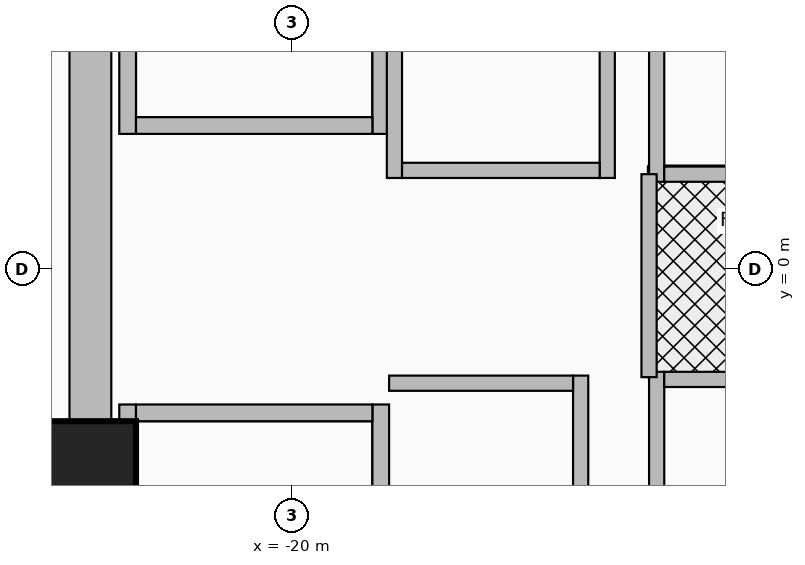
"""IFC4 building model, lengths in metres.
Left out: names, types, materials, properties, quantities, classifications, styles, units other than length and angle.
Written with IfcOpenShell. Run it as: python <this file> out.ifc"""

import sys

from ifc_helpers import new_model, si_unit, direction, frame, frame_2d, origin, origin_2d, place, context, subcontext, project, spatial, rectangle, extrude, source, transform, mapped, element, fill, save


model = new_model("IFC4")
c1 = context("Model", 3, precision=1e-05, world=origin(), true_north=direction((0.0, 1.0)))
c2 = subcontext(c1, "Body", "Model", "MODEL_VIEW")
j1 = project(units=[si_unit("LENGTHUNIT", "METRE"), si_unit("PLANEANGLEUNIT", "RADIAN")], contexts=[c1])
p1 = place(None, origin())
s1 = spatial("IfcSite", under=j1, at=p1, CompositionType="ELEMENT")
p2 = place(p1, origin())
s2 = spatial("IfcBuilding", under=s1, at=p2, CompositionType="ELEMENT")
p3 = place(p2, frame((0.0, 0.0, 153.8)))
s3 = spatial("IfcBuildingStorey", under=s2, at=p3, CompositionType="ELEMENT", Elevation=153.8)
for number, where, z_axis, x_axis in (
    (1, (-22.16, 1.78, 0.0), (0.0, 0.0, 1.0), (0.0, 1.0, 0.0)),
    (2, (-18.83, 1.78, 0.0), (0.0, 0.0, 1.0), (0.0, 1.0, 0.0)),
):
    element("IfcWall", number, at=place(p3, frame(where, z_axis=z_axis, x_axis=x_axis)), inside=s3, PredefinedType="SHEAR", context=c2, shape_type="SweptSolid", body=[
        extrude(rectangle(XDim=8.745, YDim=0.22, at=frame_2d((4.373, 0.0))), origin(), (0.0, 0.0, 1.0), 3.46),
    ])
p4 = place(p3, frame((-22.05, 1.89, 0.0), z_axis=(0.0, 0.0, 1.0), x_axis=(1.0, 0.0, 0.0)))
e3 = element("IfcWall", 3, at=p4, inside=s3, PredefinedType="SHEAR", context=c2, shape_type="SweptSolid", body=[
    extrude(rectangle(XDim=3.11, YDim=0.22, at=frame_2d((1.555, 0.0))), origin(), (0.0, 0.0, 1.0), 3.46),
])
p5 = place(p4, frame((1.0, 0.0, 0.0)))
e4 = element("IfcOpeningElement", 4, at=p5, cuts=e3, PredefinedType="OPENING", context=c2, shape_type="SweptSolid", body=[
    extrude(rectangle(XDim=1.1, YDim=2.15, at=frame_2d((0.55, 1.075))), frame((0.0, 0.125, 0.0), z_axis=(0.0, -1.0, 0.0), x_axis=(1.0, 0.0, 0.0)), (0.0, 0.0, 1.0), 0.25),
])
for number, where, z_axis, x_axis in (
    (5, (-22.16, -10.525, 0.0), (0.0, 0.0, 1.0), (0.0, 1.0, 0.0)),
    (6, (-18.83, -10.525, 0.0), (0.0, 0.0, 1.0), (0.0, 1.0, 0.0)),
):
    element("IfcWall", number, at=place(p3, frame(where, z_axis=z_axis, x_axis=x_axis)), inside=s3, PredefinedType="SHEAR", context=c2, shape_type="SweptSolid", body=[
        extrude(rectangle(XDim=8.745, YDim=0.22, at=frame_2d((4.373, 0.0))), origin(), (0.0, 0.0, 1.0), 3.46),
    ])
p6 = place(p3, frame((-22.05, -1.89, 0.0), z_axis=(0.0, 0.0, 1.0), x_axis=(1.0, 0.0, 0.0)))
e7 = element("IfcWall", 7, at=p6, inside=s3, PredefinedType="SHEAR", context=c2, shape_type="SweptSolid", body=[
    extrude(rectangle(XDim=3.11, YDim=0.22, at=frame_2d((1.555, 0.0))), origin(), (0.0, 0.0, 1.0), 3.46),
])
p7 = place(p6, frame((1.0, 0.0, 0.0)))
e8 = element("IfcOpeningElement", 8, at=p7, cuts=e7, PredefinedType="OPENING", context=c2, shape_type="SweptSolid", body=[
    extrude(rectangle(XDim=1.1, YDim=2.15, at=frame_2d((0.55, 1.075))), frame((0.0, 0.125, 0.0), z_axis=(0.0, -1.0, 0.0), x_axis=(1.0, 0.0, 0.0)), (0.0, 0.0, 1.0), 0.25),
])
p8 = place(p3, frame((-22.65, -11.075, 0.0), z_axis=(0.0, 0.0, 1.0), x_axis=(0.0, 1.0, 0.0)))
e9 = element("IfcWall", 9, at=p8, inside=s3, PredefinedType="SHEAR", context=c2, shape_type="SweptSolid", body=[
    extrude(rectangle(XDim=22.15, YDim=0.55, at=frame_2d((11.075, 0.0))), origin(), (0.0, 0.0, 1.0), 3.46),
])
m1 = source(origin(), c2, "Body", "SweptSolid", [
    extrude(rectangle(XDim=1.2, YDim=1.2, at=origin_2d()), origin(), (0.0, 0.0, 1.0), 3.7),
])
p9 = place(p3, frame((-22.65, -2.6, 0.0), z_axis=(0.0, 0.0, 1.0), x_axis=(1.0, 0.0, 0.0)))
e10 = element("IfcColumn", 10, at=p9, inside=s3, PredefinedType="COLUMN", context=c2, shape_type="MappedRepresentation", body=[
    mapped(m1, transform((0.0, 0.0, 0.0), x_axis=(1.0, 0.0, 0.0), y_axis=(0.0, 1.0, 0.0), z_axis=(0.0, 0.0, 1.0), scale=1.0)),
])
for number, where, z_axis, x_axis in (
    (11, (-18.65, 1.2, 0.0), (0.0, 0.0, 1.0), (0.0, 1.0, 0.0)),
    (12, (-15.85, 1.2, 0.0), (0.0, 0.0, 1.0), (0.0, 1.0, 0.0)),
):
    element("IfcWall", number, at=place(p3, frame(where, z_axis=z_axis, x_axis=x_axis)), inside=s3, PredefinedType="MOVABLE", context=c2, shape_type="SweptSolid", body=[
        extrude(rectangle(XDim=3.225, YDim=0.2, at=frame_2d((1.613, 0.0))), origin(), (0.0, 0.0, 1.0), 3.46),
    ])
p10 = place(p3, frame((-18.55, 1.3, 0.0), z_axis=(0.0, 0.0, 1.0), x_axis=(1.0, 0.0, 0.0)))
e13 = element("IfcWall", 13, at=p10, inside=s3, PredefinedType="MOVABLE", context=c2, shape_type="SweptSolid", body=[
    extrude(rectangle(XDim=2.6, YDim=0.2, at=frame_2d((1.3, 0.0))), origin(), (0.0, 0.0, 1.0), 3.46),
])
p11 = place(p10, frame((0.7, 0.0, 0.0)))
e14 = element("IfcOpeningElement", 14, at=p11, cuts=e13, PredefinedType="OPENING", context=c2, shape_type="SweptSolid", body=[
    extrude(rectangle(XDim=1.2, YDim=2.1, at=frame_2d((0.6, 1.05))), frame((0.0, 0.115, 0.0), z_axis=(0.0, -1.0, 0.0), x_axis=(1.0, 0.0, 0.0)), (0.0, 0.0, 1.0), 0.23),
])
p12 = place(p3, frame((-16.2, -4.6, 0.0), z_axis=(0.0, 0.0, 1.0), x_axis=(0.0, 1.0, 0.0)))
e15 = element("IfcWall", 15, at=p12, inside=s3, PredefinedType="MOVABLE", context=c2, shape_type="SweptSolid", body=[
    extrude(rectangle(XDim=3.2, YDim=0.2, at=frame_2d((1.6, 0.0))), origin(), (0.0, 0.0, 1.0), 3.46),
])
p13 = place(p3, frame((-18.72, -1.5, 0.0), z_axis=(0.0, 0.0, 1.0), x_axis=(1.0, 0.0, 0.0)))
e16 = element("IfcWall", 16, at=p13, inside=s3, PredefinedType="MOVABLE", context=c2, shape_type="SweptSolid", body=[
    extrude(rectangle(XDim=2.42, YDim=0.2, at=frame_2d((1.21, 0.0))), origin(), (0.0, 0.0, 1.0), 3.46),
])
p14 = place(p13, frame((0.61, 0.0, 0.0)))
e17 = element("IfcOpeningElement", 17, at=p14, cuts=e16, PredefinedType="OPENING", context=c2, shape_type="SweptSolid", body=[
    extrude(rectangle(XDim=1.2, YDim=2.1, at=frame_2d((0.6, 1.05))), frame((0.0, 0.115, 0.0), z_axis=(0.0, -1.0, 0.0), x_axis=(1.0, 0.0, 0.0)), (0.0, 0.0, 1.0), 0.23),
])
p15 = place(p3, frame((-15.2, 1.15, 0.0), z_axis=(0.0, 0.0, 1.0), x_axis=(0.0, 1.0, 0.0)))
e18 = element("IfcWall", 18, at=p15, inside=s3, PredefinedType="MOVABLE", context=c2, shape_type="SweptSolid", body=[
    extrude(rectangle(XDim=2.25, YDim=0.2, at=frame_2d((1.125, 0.0))), origin(), (0.0, 0.0, 1.0), 3.46),
])
p16 = place(p3, frame((-15.1, 1.25, 0.0), z_axis=(0.0, 0.0, 1.0), x_axis=(1.0, 0.0, 0.0)))
e19 = element("IfcWall", 19, at=p16, inside=s3, PredefinedType="MOVABLE", context=c2, shape_type="SweptSolid", body=[
    extrude(rectangle(XDim=1.92, YDim=0.2, at=frame_2d((0.96, 0.0))), origin(), (0.0, 0.0, 1.0), 3.46),
])
p17 = place(p3, frame((-15.2, -3.7, 0.0), z_axis=(0.0, 0.0, 1.0), x_axis=(0.0, 1.0, 0.0)))
e20 = element("IfcWall", 20, at=p17, inside=s3, PredefinedType="MOVABLE", context=c2, shape_type="SweptSolid", body=[
    extrude(rectangle(XDim=2.35, YDim=0.2, at=frame_2d((1.175, 0.0))), origin(), (0.0, 0.0, 1.0), 3.46),
])
p18 = place(p3, frame((-15.1, -1.45, 0.0), z_axis=(0.0, 0.0, 1.0), x_axis=(1.0, 0.0, 0.0)))
e21 = element("IfcWall", 21, at=p18, inside=s3, PredefinedType="MOVABLE", context=c2, shape_type="SweptSolid", body=[
    extrude(rectangle(XDim=1.92, YDim=0.2, at=frame_2d((0.96, 0.0))), origin(), (0.0, 0.0, 1.0), 3.46),
])
p19 = place(p3, frame((-15.3, -1.42, 0.0), z_axis=(0.0, 0.0, 1.0), x_axis=(0.0, 1.0, 0.0)))
e22 = element("IfcWall", 22, at=p19, inside=s3, PredefinedType="PARTITIONING", context=c2, shape_type="SweptSolid", body=[
    extrude(rectangle(XDim=2.67, YDim=0.2, at=frame_2d((1.335, 0.0))), origin(), (0.0, 0.0, 1.0), 3.46),
])
p20 = place(p19, frame((0.78, 0.0, 0.0)))
e23 = element("IfcOpeningElement", 23, at=p20, cuts=e22, PredefinedType="OPENING", context=c2, shape_type="SweptSolid", body=[
    extrude(rectangle(XDim=1.05, YDim=2.15, at=frame_2d((0.525, 1.075))), frame((0.0, 0.115, 0.0), z_axis=(0.0, -1.0, 0.0), x_axis=(1.0, 0.0, 0.0)), (0.0, 0.0, 1.0), 0.23),
])
p21 = place(p11, origin())
e24 = element("IfcDoor", 24, at=p21, inside=s3, OperationType="DOUBLE_DOOR_SLIDING", PredefinedType="DOOR", context=c2, shape_type="SweptSolid", body=[
    extrude(rectangle(XDim=1.2, YDim=2.1, at=frame_2d((0.6, 1.05))), frame((0.0, 0.025, 0.0), z_axis=(0.0, -1.0, 0.0), x_axis=(1.0, 0.0, 0.0)), (0.0, 0.0, 1.0), 0.05),
])
fill(e14, e24)
p22 = place(p14, origin())
e25 = element("IfcDoor", 25, at=p22, inside=s3, OperationType="DOUBLE_DOOR_SLIDING", PredefinedType="DOOR", context=c2, shape_type="SweptSolid", body=[
    extrude(rectangle(XDim=1.2, YDim=2.1, at=frame_2d((0.6, 1.05))), frame((0.0, 0.025, 0.0), z_axis=(0.0, -1.0, 0.0), x_axis=(1.0, 0.0, 0.0)), (0.0, 0.0, 1.0), 0.05),
])
fill(e17, e25)
p23 = place(p20, origin())
e26 = element("IfcDoor", 26, at=p23, inside=s3, OperationType="SINGLE_SWING_RIGHT", PredefinedType="DOOR", context=c2, shape_type="SweptSolid", body=[
    extrude(rectangle(XDim=1.05, YDim=2.15, at=frame_2d((0.525, 1.075))), frame((0.0, 0.025, 0.0), z_axis=(0.0, -1.0, 0.0), x_axis=(1.0, 0.0, 0.0)), (0.0, 0.0, 1.0), 0.05),
])
fill(e23, e26)
p24 = place(p5, frame((1.1, 0.0, 0.0), z_axis=(0.0, 0.0, 1.0), x_axis=(-1.0, 0.0, 0.0)))
e27 = element("IfcDoor", 27, at=p24, inside=s3, OperationType="SINGLE_SWING_LEFT", PredefinedType="DOOR", context=c2, shape_type="SweptSolid", body=[
    extrude(rectangle(XDim=1.1, YDim=2.15, at=frame_2d((0.55, 1.075))), frame((0.0, 0.025, 0.0), z_axis=(0.0, -1.0, 0.0), x_axis=(1.0, 0.0, 0.0)), (0.0, 0.0, 1.0), 0.05),
])
fill(e4, e27)
p25 = place(p7, origin())
e28 = element("IfcDoor", 28, at=p25, inside=s3, OperationType="SINGLE_SWING_RIGHT", PredefinedType="DOOR", context=c2, shape_type="SweptSolid", body=[
    extrude(rectangle(XDim=1.1, YDim=2.15, at=frame_2d((0.55, 1.075))), frame((0.0, 0.025, 0.0), z_axis=(0.0, -1.0, 0.0), x_axis=(1.0, 0.0, 0.0)), (0.0, 0.0, 1.0), 0.05),
])
fill(e8, e28)
save(model, sys.argv[1])
